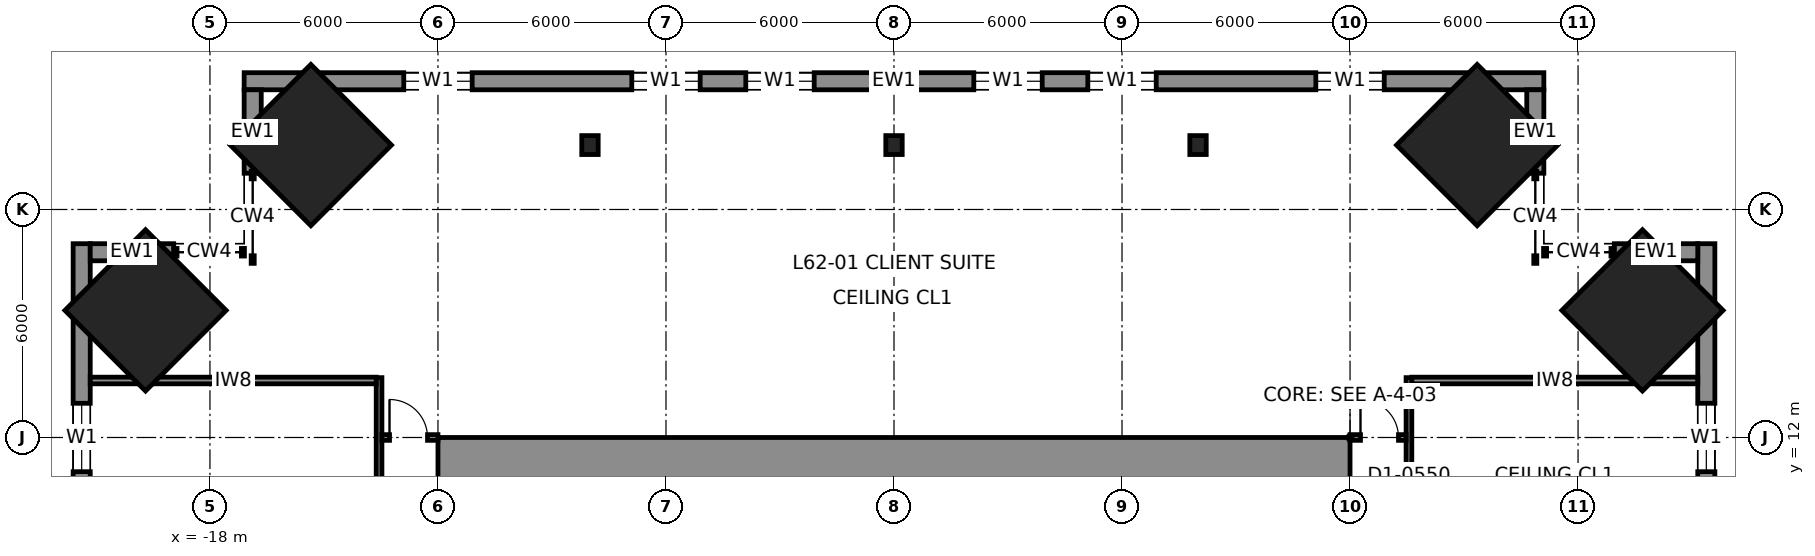
"""IFC4 building model, lengths in metres.
Left out: names, types, materials, properties, quantities, classifications, styles, units other than length and angle.
Written with IfcOpenShell. Run it as: python <this file> out.ifc"""

import sys

from ifc_helpers import new_model, si_unit, direction, frame, frame_2d, origin, origin_2d, place, context, subcontext, project, spatial, rectangle, i_section, extrude, element, fill, save


model = new_model("IFC4")
c1 = context("Model", 3, precision=1e-05, world=origin(), true_north=direction((0.0, 1.0)))
c2 = subcontext(c1, "Body", "Model", "MODEL_VIEW")
j1 = project(units=[si_unit("LENGTHUNIT", "METRE"), si_unit("PLANEANGLEUNIT", "RADIAN")], contexts=[c1])
p1 = place(None, origin())
s1 = spatial("IfcSite", under=j1, at=p1, CompositionType="ELEMENT")
p2 = place(p1, origin())
s2 = spatial("IfcBuilding", under=s1, at=p2, CompositionType="ELEMENT")
p3 = place(p2, frame((0.0, 0.0, 277.8)))
s3 = spatial("IfcBuildingStorey", under=s2, at=p3, CompositionType="ELEMENT", Elevation=277.8)
for number, where, z_axis, x_axis in (
    (1, (15.345, 19.695, 0.0), (-0.04, -0.04, 0.998), (0.707, -0.708, 0.0)),
    (2, (19.695, 15.345, 0.0), (-0.04, -0.04, 0.998), (0.708, -0.707, 0.0)),
    (3, (-19.695, 15.345, 0.0), (0.04, -0.04, 0.998), (0.708, 0.707, 0.0)),
    (4, (-15.345, 19.695, 0.0), (0.04, -0.04, 0.998), (0.707, 0.708, 0.0)),
):
    element("IfcColumn", number, at=place(p3, frame(where, z_axis=z_axis, x_axis=x_axis)), inside=s3, PredefinedType="COLUMN", context=c2, shape_type="SweptSolid", body=[
        extrude(rectangle(XDim=3.0, YDim=3.0, at=origin_2d()), origin(), (0.0, 0.0, 1.0), 4.007),
    ])
for number, where, z_axis, x_axis in (
    (5, (0.0, 19.695, 0.0), (0.0, -0.04, 0.999), (1.0, 0.0, 0.0)),
    (6, (8.0, 19.695, 0.0), (0.0, -0.04, 0.999), (1.0, 0.0, 0.0)),
    (7, (-8.0, 19.695, 0.0), (0.0, -0.04, 0.999), (1.0, 0.0, 0.0)),
):
    element("IfcColumn", number, at=place(p3, frame(where, z_axis=z_axis, x_axis=x_axis)), inside=s3, PredefinedType="COLUMN", context=c2, shape_type="SweptSolid", body=[
        extrude(i_section(OverallWidth=0.432, OverallDepth=0.498, WebThickness=0.056, FlangeThickness=0.089, at=origin_2d()), origin(), (0.0, 0.0, 1.0), 4.003),
    ])
p4 = place(p3, frame((-12.0, 11.25, 0.0), z_axis=(0.0, 0.0, 1.0), x_axis=(1.0, 0.0, 0.0)))
e8 = element("IfcWall", 8, at=p4, inside=s3, PredefinedType="SHEAR", context=c2, shape_type="SweptSolid", body=[
    extrude(rectangle(XDim=24.0, YDim=1.5, at=frame_2d((12.0, 0.0))), origin(), (0.0, 0.0, 1.0), 4.0),
])
p5 = place(p3, frame((17.1, 21.375, 0.0), z_axis=(0.0, 0.0, 1.0), x_axis=(-1.0, 0.0, 0.0)))
e9 = element("IfcWall", 9, at=p5, inside=s3, PredefinedType="SOLIDWALL", context=c2, shape_type="SweptSolid", body=[
    extrude(rectangle(XDim=34.2, YDim=0.45, at=frame_2d((17.1, 0.0))), origin(), (0.0, 0.0, 1.0), 3.83),
])
p6 = place(p5, frame((4.2, 0.0, 0.7)))
e10 = element("IfcOpeningElement", 10, at=p6, cuts=e9, PredefinedType="OPENING", context=c2, shape_type="SweptSolid", body=[
    extrude(rectangle(XDim=1.8, YDim=2.6, at=frame_2d((0.9, 1.3))), frame((0.0, 0.235, 0.0), z_axis=(0.0, -1.0, 0.0), x_axis=(1.0, 0.0, 0.0)), (0.0, 0.0, 1.0), 0.47),
])
p7 = place(p5, frame((10.2, 0.0, 0.7)))
e11 = element("IfcOpeningElement", 11, at=p7, cuts=e9, PredefinedType="OPENING", context=c2, shape_type="SweptSolid", body=[
    extrude(rectangle(XDim=1.8, YDim=2.6, at=frame_2d((0.9, 1.3))), frame((0.0, 0.235, 0.0), z_axis=(0.0, -1.0, 0.0), x_axis=(1.0, 0.0, 0.0)), (0.0, 0.0, 1.0), 0.47),
])
p8 = place(p5, frame((13.2, 0.0, 0.7)))
e12 = element("IfcOpeningElement", 12, at=p8, cuts=e9, PredefinedType="OPENING", context=c2, shape_type="SweptSolid", body=[
    extrude(rectangle(XDim=1.8, YDim=2.6, at=frame_2d((0.9, 1.3))), frame((0.0, 0.235, 0.0), z_axis=(0.0, -1.0, 0.0), x_axis=(1.0, 0.0, 0.0)), (0.0, 0.0, 1.0), 0.47),
])
p9 = place(p5, frame((19.2, 0.0, 0.7)))
e13 = element("IfcOpeningElement", 13, at=p9, cuts=e9, PredefinedType="OPENING", context=c2, shape_type="SweptSolid", body=[
    extrude(rectangle(XDim=1.8, YDim=2.6, at=frame_2d((0.9, 1.3))), frame((0.0, 0.235, 0.0), z_axis=(0.0, -1.0, 0.0), x_axis=(1.0, 0.0, 0.0)), (0.0, 0.0, 1.0), 0.47),
])
p10 = place(p5, frame((22.2, 0.0, 0.7)))
e14 = element("IfcOpeningElement", 14, at=p10, cuts=e9, PredefinedType="OPENING", context=c2, shape_type="SweptSolid", body=[
    extrude(rectangle(XDim=1.8, YDim=2.6, at=frame_2d((0.9, 1.3))), frame((0.0, 0.235, 0.0), z_axis=(0.0, -1.0, 0.0), x_axis=(1.0, 0.0, 0.0)), (0.0, 0.0, 1.0), 0.47),
])
p11 = place(p5, frame((28.2, 0.0, 0.7)))
e15 = element("IfcOpeningElement", 15, at=p11, cuts=e9, PredefinedType="OPENING", context=c2, shape_type="SweptSolid", body=[
    extrude(rectangle(XDim=1.8, YDim=2.6, at=frame_2d((0.9, 1.3))), frame((0.0, 0.235, 0.0), z_axis=(0.0, -1.0, 0.0), x_axis=(1.0, 0.0, 0.0)), (0.0, 0.0, 1.0), 0.47),
])
p12 = place(p3, frame((21.375, -17.1, 0.0), z_axis=(0.0, 0.0, 1.0), x_axis=(0.0, 1.0, 0.0)))
e16 = element("IfcWall", 16, at=p12, inside=s3, PredefinedType="SOLIDWALL", context=c2, shape_type="SweptSolid", body=[
    extrude(rectangle(XDim=34.2, YDim=0.45, at=frame_2d((17.1, 0.0))), origin(), (0.0, 0.0, 1.0), 3.83),
])
p13 = place(p12, frame((4.2, 0.0, 0.7)))
e17 = element("IfcOpeningElement", 17, at=p13, cuts=e16, PredefinedType="OPENING", context=c2, shape_type="SweptSolid", body=[
    extrude(rectangle(XDim=1.8, YDim=2.6, at=frame_2d((0.9, 1.3))), frame((0.0, 0.235, 0.0), z_axis=(0.0, -1.0, 0.0), x_axis=(1.0, 0.0, 0.0)), (0.0, 0.0, 1.0), 0.47),
])
p14 = place(p12, frame((10.2, 0.0, 0.7)))
e18 = element("IfcOpeningElement", 18, at=p14, cuts=e16, PredefinedType="OPENING", context=c2, shape_type="SweptSolid", body=[
    extrude(rectangle(XDim=1.8, YDim=2.6, at=frame_2d((0.9, 1.3))), frame((0.0, 0.235, 0.0), z_axis=(0.0, -1.0, 0.0), x_axis=(1.0, 0.0, 0.0)), (0.0, 0.0, 1.0), 0.47),
])
p15 = place(p12, frame((13.2, 0.0, 0.7)))
e19 = element("IfcOpeningElement", 19, at=p15, cuts=e16, PredefinedType="OPENING", context=c2, shape_type="SweptSolid", body=[
    extrude(rectangle(XDim=1.8, YDim=2.6, at=frame_2d((0.9, 1.3))), frame((0.0, 0.235, 0.0), z_axis=(0.0, -1.0, 0.0), x_axis=(1.0, 0.0, 0.0)), (0.0, 0.0, 1.0), 0.47),
])
p16 = place(p12, frame((19.2, 0.0, 0.7)))
e20 = element("IfcOpeningElement", 20, at=p16, cuts=e16, PredefinedType="OPENING", context=c2, shape_type="SweptSolid", body=[
    extrude(rectangle(XDim=1.8, YDim=2.6, at=frame_2d((0.9, 1.3))), frame((0.0, 0.235, 0.0), z_axis=(0.0, -1.0, 0.0), x_axis=(1.0, 0.0, 0.0)), (0.0, 0.0, 1.0), 0.47),
])
p17 = place(p12, frame((22.2, 0.0, 0.7)))
e21 = element("IfcOpeningElement", 21, at=p17, cuts=e16, PredefinedType="OPENING", context=c2, shape_type="SweptSolid", body=[
    extrude(rectangle(XDim=1.8, YDim=2.6, at=frame_2d((0.9, 1.3))), frame((0.0, 0.235, 0.0), z_axis=(0.0, -1.0, 0.0), x_axis=(1.0, 0.0, 0.0)), (0.0, 0.0, 1.0), 0.47),
])
p18 = place(p12, frame((28.2, 0.0, 0.7)))
e22 = element("IfcOpeningElement", 22, at=p18, cuts=e16, PredefinedType="OPENING", context=c2, shape_type="SweptSolid", body=[
    extrude(rectangle(XDim=1.8, YDim=2.6, at=frame_2d((0.9, 1.3))), frame((0.0, 0.235, 0.0), z_axis=(0.0, -1.0, 0.0), x_axis=(1.0, 0.0, 0.0)), (0.0, 0.0, 1.0), 0.47),
])
p19 = place(p3, frame((-21.375, 17.1, 0.0), z_axis=(0.0, 0.0, 1.0), x_axis=(0.0, -1.0, 0.0)))
e23 = element("IfcWall", 23, at=p19, inside=s3, PredefinedType="SOLIDWALL", context=c2, shape_type="SweptSolid", body=[
    extrude(rectangle(XDim=34.2, YDim=0.45, at=frame_2d((17.1, 0.0))), origin(), (0.0, 0.0, 1.0), 3.83),
])
p20 = place(p19, frame((4.2, 0.0, 0.7)))
e24 = element("IfcOpeningElement", 24, at=p20, cuts=e23, PredefinedType="OPENING", context=c2, shape_type="SweptSolid", body=[
    extrude(rectangle(XDim=1.8, YDim=2.6, at=frame_2d((0.9, 1.3))), frame((0.0, 0.235, 0.0), z_axis=(0.0, -1.0, 0.0), x_axis=(1.0, 0.0, 0.0)), (0.0, 0.0, 1.0), 0.47),
])
p21 = place(p19, frame((10.2, 0.0, 0.7)))
e25 = element("IfcOpeningElement", 25, at=p21, cuts=e23, PredefinedType="OPENING", context=c2, shape_type="SweptSolid", body=[
    extrude(rectangle(XDim=1.8, YDim=2.6, at=frame_2d((0.9, 1.3))), frame((0.0, 0.235, 0.0), z_axis=(0.0, -1.0, 0.0), x_axis=(1.0, 0.0, 0.0)), (0.0, 0.0, 1.0), 0.47),
])
p22 = place(p19, frame((13.2, 0.0, 0.7)))
e26 = element("IfcOpeningElement", 26, at=p22, cuts=e23, PredefinedType="OPENING", context=c2, shape_type="SweptSolid", body=[
    extrude(rectangle(XDim=1.8, YDim=2.6, at=frame_2d((0.9, 1.3))), frame((0.0, 0.235, 0.0), z_axis=(0.0, -1.0, 0.0), x_axis=(1.0, 0.0, 0.0)), (0.0, 0.0, 1.0), 0.47),
])
p23 = place(p19, frame((19.2, 0.0, 0.7)))
e27 = element("IfcOpeningElement", 27, at=p23, cuts=e23, PredefinedType="OPENING", context=c2, shape_type="SweptSolid", body=[
    extrude(rectangle(XDim=1.8, YDim=2.6, at=frame_2d((0.9, 1.3))), frame((0.0, 0.235, 0.0), z_axis=(0.0, -1.0, 0.0), x_axis=(1.0, 0.0, 0.0)), (0.0, 0.0, 1.0), 0.47),
])
p24 = place(p19, frame((22.2, 0.0, 0.7)))
e28 = element("IfcOpeningElement", 28, at=p24, cuts=e23, PredefinedType="OPENING", context=c2, shape_type="SweptSolid", body=[
    extrude(rectangle(XDim=1.8, YDim=2.6, at=frame_2d((0.9, 1.3))), frame((0.0, 0.235, 0.0), z_axis=(0.0, -1.0, 0.0), x_axis=(1.0, 0.0, 0.0)), (0.0, 0.0, 1.0), 0.47),
])
p25 = place(p19, frame((28.2, 0.0, 0.7)))
e29 = element("IfcOpeningElement", 29, at=p25, cuts=e23, PredefinedType="OPENING", context=c2, shape_type="SweptSolid", body=[
    extrude(rectangle(XDim=1.8, YDim=2.6, at=frame_2d((0.9, 1.3))), frame((0.0, 0.235, 0.0), z_axis=(0.0, -1.0, 0.0), x_axis=(1.0, 0.0, 0.0)), (0.0, 0.0, 1.0), 0.47),
])
for number, where, z_axis, x_axis in (
    (30, (16.875, 18.954, 0.0), (0.0, 0.0, 1.0), (0.0, 1.0, 0.0)),
    (31, (18.954, 16.875, 0.0), (0.0, 0.0, 1.0), (1.0, 0.0, 0.0)),
    (32, (-16.875, 18.954, 0.0), (0.0, 0.0, 1.0), (0.0, 1.0, 0.0)),
    (33, (-18.954, 16.875, 0.0), (0.0, 0.0, 1.0), (-1.0, 0.0, 0.0)),
):
    element("IfcWall", number, at=place(p3, frame(where, z_axis=z_axis, x_axis=x_axis)), inside=s3, PredefinedType="SOLIDWALL", context=c2, shape_type="SweptSolid", body=[
        extrude(rectangle(XDim=2.196, YDim=0.45, at=frame_2d((1.098, 0.0))), origin(), (0.0, 0.0, 1.0), 3.83),
    ])
p26 = place(p3, frame((13.55, -13.575, 0.0), z_axis=(0.0, 0.0, 1.0), x_axis=(0.0, 1.0, 0.0)))
e34 = element("IfcWall", 34, at=p26, inside=s3, PredefinedType="PARTITIONING", context=c2, shape_type="SweptSolid", body=[
    extrude(rectangle(XDim=27.15, YDim=0.15, at=frame_2d((13.575, 0.0))), origin(), (0.0, 0.0, 1.0), 3.83),
])
p27 = place(p26, frame((3.175, 0.0, 0.0)))
e35 = element("IfcOpeningElement", 35, at=p27, cuts=e34, PredefinedType="OPENING", context=c2, shape_type="SweptSolid", body=[
    extrude(rectangle(XDim=1.0, YDim=2.3, at=frame_2d((0.5, 1.15))), frame((0.0, 0.085, 0.0), z_axis=(0.0, -1.0, 0.0), x_axis=(1.0, 0.0, 0.0)), (0.0, 0.0, 1.0), 0.17),
])
p28 = place(p26, frame((6.625, 0.0, 0.0)))
e36 = element("IfcOpeningElement", 36, at=p28, cuts=e34, PredefinedType="OPENING", context=c2, shape_type="SweptSolid", body=[
    extrude(rectangle(XDim=1.0, YDim=2.3, at=frame_2d((0.5, 1.15))), frame((0.0, 0.085, 0.0), z_axis=(0.0, -1.0, 0.0), x_axis=(1.0, 0.0, 0.0)), (0.0, 0.0, 1.0), 0.17),
])
p29 = place(p26, frame((17.075, 0.0, 0.0)))
e37 = element("IfcOpeningElement", 37, at=p29, cuts=e34, PredefinedType="OPENING", context=c2, shape_type="SweptSolid", body=[
    extrude(rectangle(XDim=1.0, YDim=2.3, at=frame_2d((0.5, 1.15))), frame((0.0, 0.085, 0.0), z_axis=(0.0, -1.0, 0.0), x_axis=(1.0, 0.0, 0.0)), (0.0, 0.0, 1.0), 0.17),
])
p30 = place(p26, frame((22.975, 0.0, 0.0)))
e38 = element("IfcOpeningElement", 38, at=p30, cuts=e34, PredefinedType="OPENING", context=c2, shape_type="SweptSolid", body=[
    extrude(rectangle(XDim=1.0, YDim=2.3, at=frame_2d((0.5, 1.15))), frame((0.0, 0.085, 0.0), z_axis=(0.0, -1.0, 0.0), x_axis=(1.0, 0.0, 0.0)), (0.0, 0.0, 1.0), 0.17),
])
p31 = place(p26, frame((9.825, 0.0, 0.0)))
e39 = element("IfcOpeningElement", 39, at=p31, cuts=e34, PredefinedType="OPENING", context=c2, shape_type="SweptSolid", body=[
    extrude(rectangle(XDim=1.0, YDim=2.3, at=frame_2d((0.5, 1.15))), frame((0.0, 0.085, 0.0), z_axis=(0.0, -1.0, 0.0), x_axis=(1.0, 0.0, 0.0)), (0.0, 0.0, 1.0), 0.17),
])
p32 = place(p3, frame((-13.55, 13.575, 0.0), z_axis=(0.0, 0.0, 1.0), x_axis=(0.0, -1.0, 0.0)))
e40 = element("IfcWall", 40, at=p32, inside=s3, PredefinedType="PARTITIONING", context=c2, shape_type="SweptSolid", body=[
    extrude(rectangle(XDim=27.15, YDim=0.15, at=frame_2d((13.575, 0.0))), origin(), (0.0, 0.0, 1.0), 3.83),
])
p33 = place(p32, frame((21.225, 0.0, 0.0)))
e41 = element("IfcOpeningElement", 41, at=p33, cuts=e40, PredefinedType="OPENING", context=c2, shape_type="SweptSolid", body=[
    extrude(rectangle(XDim=1.4, YDim=2.3, at=frame_2d((0.7, 1.15))), frame((0.0, 0.085, 0.0), z_axis=(0.0, -1.0, 0.0), x_axis=(1.0, 0.0, 0.0)), (0.0, 0.0, 1.0), 0.17),
])
p34 = place(p32, frame((9.075, 0.0, 0.0)))
e42 = element("IfcOpeningElement", 42, at=p34, cuts=e40, PredefinedType="OPENING", context=c2, shape_type="SweptSolid", body=[
    extrude(rectangle(XDim=1.0, YDim=2.3, at=frame_2d((0.5, 1.15))), frame((0.0, 0.085, 0.0), z_axis=(0.0, -1.0, 0.0), x_axis=(1.0, 0.0, 0.0)), (0.0, 0.0, 1.0), 0.17),
])
p35 = place(p32, frame((16.575, 0.0, 0.0)))
e43 = element("IfcOpeningElement", 43, at=p35, cuts=e40, PredefinedType="OPENING", context=c2, shape_type="SweptSolid", body=[
    extrude(rectangle(XDim=1.0, YDim=2.3, at=frame_2d((0.5, 1.15))), frame((0.0, 0.085, 0.0), z_axis=(0.0, -1.0, 0.0), x_axis=(1.0, 0.0, 0.0)), (0.0, 0.0, 1.0), 0.17),
])
p36 = place(p3, frame((12.0, 12.0, 0.0), z_axis=(0.0, 0.0, 1.0), x_axis=(1.0, 0.0, 0.0)))
e44 = element("IfcWall", 44, at=p36, inside=s3, PredefinedType="PARTITIONING", context=c2, shape_type="SweptSolid", body=[
    extrude(rectangle(XDim=1.475, YDim=0.15, at=frame_2d((0.738, 0.0))), origin(), (0.0, 0.0, 1.0), 3.83),
])
p37 = place(p36, frame((0.275, 0.0, 0.0)))
e45 = element("IfcOpeningElement", 45, at=p37, cuts=e44, PredefinedType="OPENING", context=c2, shape_type="SweptSolid", body=[
    extrude(rectangle(XDim=1.0, YDim=2.3, at=frame_2d((0.5, 1.15))), frame((0.0, 0.085, 0.0), z_axis=(0.0, -1.0, 0.0), x_axis=(1.0, 0.0, 0.0)), (0.0, 0.0, 1.0), 0.17),
])
p38 = place(p3, frame((-13.475, 12.0, 0.0), z_axis=(0.0, 0.0, 1.0), x_axis=(1.0, 0.0, 0.0)))
e46 = element("IfcWall", 46, at=p38, inside=s3, PredefinedType="PARTITIONING", context=c2, shape_type="SweptSolid", body=[
    extrude(rectangle(XDim=1.475, YDim=0.15, at=frame_2d((0.738, 0.0))), origin(), (0.0, 0.0, 1.0), 3.83),
])
p39 = place(p38, frame((0.2, 0.0, 0.0)))
e47 = element("IfcOpeningElement", 47, at=p39, cuts=e46, PredefinedType="OPENING", context=c2, shape_type="SweptSolid", body=[
    extrude(rectangle(XDim=1.0, YDim=2.3, at=frame_2d((0.5, 1.15))), frame((0.0, 0.085, 0.0), z_axis=(0.0, -1.0, 0.0), x_axis=(1.0, 0.0, 0.0)), (0.0, 0.0, 1.0), 0.17),
])
for number, where, z_axis, x_axis in (
    (48, (13.625, 13.5, 0.0), (0.0, 0.0, 1.0), (1.0, 0.0, 0.0)),
    (49, (-21.15, 13.5, 0.0), (0.0, 0.0, 1.0), (1.0, 0.0, 0.0)),
):
    element("IfcWall", number, at=place(p3, frame(where, z_axis=z_axis, x_axis=x_axis)), inside=s3, PredefinedType="PARTITIONING", context=c2, shape_type="SweptSolid", body=[
        extrude(rectangle(XDim=7.525, YDim=0.175, at=frame_2d((3.762, 0.0))), origin(), (0.0, 0.0, 1.0), 3.83),
    ])
p40 = place(p6, origin())
e50 = element("IfcWindow", 50, at=p40, inside=s3, PartitioningType="SINGLE_PANEL", PredefinedType="WINDOW", context=c2, shape_type="SweptSolid", body=[
    extrude(rectangle(XDim=1.8, YDim=2.6, at=frame_2d((0.9, 1.3))), frame((0.0, 0.03, 0.0), z_axis=(0.0, -1.0, 0.0), x_axis=(1.0, 0.0, 0.0)), (0.0, 0.0, 1.0), 0.06),
])
fill(e10, e50)
p41 = place(p7, origin())
e51 = element("IfcWindow", 51, at=p41, inside=s3, PartitioningType="SINGLE_PANEL", PredefinedType="WINDOW", context=c2, shape_type="SweptSolid", body=[
    extrude(rectangle(XDim=1.8, YDim=2.6, at=frame_2d((0.9, 1.3))), frame((0.0, 0.03, 0.0), z_axis=(0.0, -1.0, 0.0), x_axis=(1.0, 0.0, 0.0)), (0.0, 0.0, 1.0), 0.06),
])
fill(e11, e51)
p42 = place(p8, origin())
e52 = element("IfcWindow", 52, at=p42, inside=s3, PartitioningType="SINGLE_PANEL", PredefinedType="WINDOW", context=c2, shape_type="SweptSolid", body=[
    extrude(rectangle(XDim=1.8, YDim=2.6, at=frame_2d((0.9, 1.3))), frame((0.0, 0.03, 0.0), z_axis=(0.0, -1.0, 0.0), x_axis=(1.0, 0.0, 0.0)), (0.0, 0.0, 1.0), 0.06),
])
fill(e12, e52)
p43 = place(p9, origin())
e53 = element("IfcWindow", 53, at=p43, inside=s3, PartitioningType="SINGLE_PANEL", PredefinedType="WINDOW", context=c2, shape_type="SweptSolid", body=[
    extrude(rectangle(XDim=1.8, YDim=2.6, at=frame_2d((0.9, 1.3))), frame((0.0, 0.03, 0.0), z_axis=(0.0, -1.0, 0.0), x_axis=(1.0, 0.0, 0.0)), (0.0, 0.0, 1.0), 0.06),
])
fill(e13, e53)
p44 = place(p10, origin())
e54 = element("IfcWindow", 54, at=p44, inside=s3, PartitioningType="SINGLE_PANEL", PredefinedType="WINDOW", context=c2, shape_type="SweptSolid", body=[
    extrude(rectangle(XDim=1.8, YDim=2.6, at=frame_2d((0.9, 1.3))), frame((0.0, 0.03, 0.0), z_axis=(0.0, -1.0, 0.0), x_axis=(1.0, 0.0, 0.0)), (0.0, 0.0, 1.0), 0.06),
])
fill(e14, e54)
p45 = place(p11, origin())
e55 = element("IfcWindow", 55, at=p45, inside=s3, PartitioningType="SINGLE_PANEL", PredefinedType="WINDOW", context=c2, shape_type="SweptSolid", body=[
    extrude(rectangle(XDim=1.8, YDim=2.6, at=frame_2d((0.9, 1.3))), frame((0.0, 0.03, 0.0), z_axis=(0.0, -1.0, 0.0), x_axis=(1.0, 0.0, 0.0)), (0.0, 0.0, 1.0), 0.06),
])
fill(e15, e55)
p46 = place(p18, origin())
e56 = element("IfcWindow", 56, at=p46, inside=s3, PartitioningType="SINGLE_PANEL", PredefinedType="WINDOW", context=c2, shape_type="SweptSolid", body=[
    extrude(rectangle(XDim=1.8, YDim=2.6, at=frame_2d((0.9, 1.3))), frame((0.0, 0.03, 0.0), z_axis=(0.0, -1.0, 0.0), x_axis=(1.0, 0.0, 0.0)), (0.0, 0.0, 1.0), 0.06),
])
fill(e22, e56)
p47 = place(p20, origin())
e57 = element("IfcWindow", 57, at=p47, inside=s3, PartitioningType="SINGLE_PANEL", PredefinedType="WINDOW", context=c2, shape_type="SweptSolid", body=[
    extrude(rectangle(XDim=1.8, YDim=2.6, at=frame_2d((0.9, 1.3))), frame((0.0, 0.03, 0.0), z_axis=(0.0, -1.0, 0.0), x_axis=(1.0, 0.0, 0.0)), (0.0, 0.0, 1.0), 0.06),
])
fill(e24, e57)
p48 = place(p39, origin())
e58 = element("IfcDoor", 58, at=p48, inside=s3, OperationType="SINGLE_SWING_LEFT", PredefinedType="DOOR", context=c2, shape_type="SweptSolid", body=[
    extrude(rectangle(XDim=1.0, YDim=2.3, at=frame_2d((0.5, 1.15))), frame((0.0, 0.025, 0.0), z_axis=(0.0, -1.0, 0.0), x_axis=(1.0, 0.0, 0.0)), (0.0, 0.0, 1.0), 0.05),
])
fill(e47, e58)
p49 = place(p37, origin())
e59 = element("IfcDoor", 59, at=p49, inside=s3, OperationType="SINGLE_SWING_LEFT", PredefinedType="DOOR", context=c2, shape_type="SweptSolid", body=[
    extrude(rectangle(XDim=1.0, YDim=2.3, at=frame_2d((0.5, 1.15))), frame((0.0, 0.025, 0.0), z_axis=(0.0, -1.0, 0.0), x_axis=(1.0, 0.0, 0.0)), (0.0, 0.0, 1.0), 0.05),
])
fill(e45, e59)
save(model, sys.argv[1])
